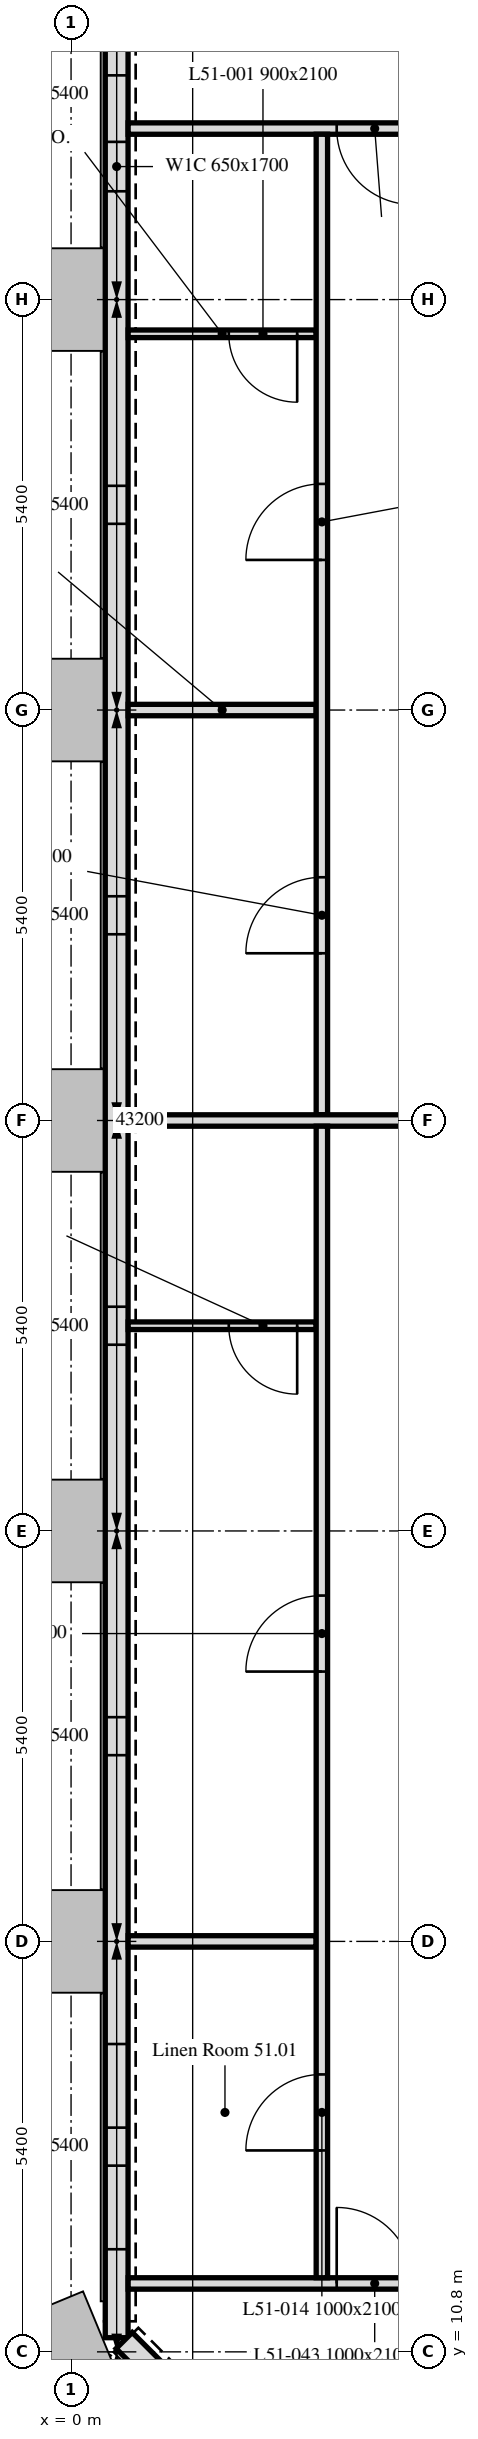
"""IFC4 building model, lengths in metres.
Left out: names, types, materials, properties, quantities, classifications, styles, units other than length and angle.
Written with IfcOpenShell. Run it as: python <this file> out.ifc"""

import sys

from ifc_helpers import new_model, si_unit, direction, frame, frame_2d, origin, place, context, subcontext, project, spatial, rectangle, extrude, element, fill, save


model = new_model("IFC4")
c1 = context("Model", 3, precision=1e-05, world=origin(), true_north=direction((0.0, 1.0)))
c2 = subcontext(c1, "Body", "Model", "MODEL_VIEW")
j1 = project(units=[si_unit("LENGTHUNIT", "METRE"), si_unit("PLANEANGLEUNIT", "RADIAN")], contexts=[c1])
p1 = place(None, origin())
s1 = spatial("IfcSite", under=j1, at=p1, CompositionType="ELEMENT")
p2 = place(p1, origin())
s2 = spatial("IfcBuilding", under=s1, at=p2, CompositionType="ELEMENT")
p3 = place(p2, frame((0.0, 0.0, 207.1)))
s3 = spatial("IfcBuildingStorey", under=s2, at=p3, CompositionType="ELEMENT", Elevation=207.1)
p4 = place(p3, frame((0.6, 43.014, 0.0), z_axis=(0.0, 0.0, 1.0), x_axis=(0.0, -1.0, 0.0)))
e1 = element("IfcWall", 1, at=p4, inside=s3, PredefinedType="SOLIDWALL", context=c2, shape_type="SweptSolid", body=[
    extrude(rectangle(XDim=32.027, YDim=0.3, at=frame_2d((16.014, 0.0))), origin(), (0.0, 0.0, 1.0), 3.0),
])
p5 = place(p4, frame((1.164, 0.0, 0.9)))
e2 = element("IfcOpeningElement", 2, at=p5, cuts=e1, PredefinedType="OPENING", context=c2, shape_type="SweptSolid", body=[
    extrude(rectangle(XDim=1.1, YDim=1.7, at=frame_2d((0.55, 0.85))), frame((0.0, 0.16, 0.0), z_axis=(0.0, -1.0, 0.0), x_axis=(1.0, 0.0, 0.0)), (0.0, 0.0, 1.0), 0.32),
])
p6 = place(p4, frame((3.139, 0.0, 0.9)))
e3 = element("IfcOpeningElement", 3, at=p6, cuts=e1, PredefinedType="OPENING", context=c2, shape_type="SweptSolid", body=[
    extrude(rectangle(XDim=0.65, YDim=1.7, at=frame_2d((0.325, 0.85))), frame((0.0, 0.16, 0.0), z_axis=(0.0, -1.0, 0.0), x_axis=(1.0, 0.0, 0.0)), (0.0, 0.0, 1.0), 0.32),
])
p7 = place(p4, frame((7.664, 0.0, 0.9)))
e4 = element("IfcOpeningElement", 4, at=p7, cuts=e1, PredefinedType="OPENING", context=c2, shape_type="SweptSolid", body=[
    extrude(rectangle(XDim=0.5, YDim=1.7, at=frame_2d((0.25, 0.85))), frame((0.0, 0.16, 0.0), z_axis=(0.0, -1.0, 0.0), x_axis=(1.0, 0.0, 0.0)), (0.0, 0.0, 1.0), 0.32),
])
p8 = place(p4, frame((13.064, 0.0, 0.9)))
e5 = element("IfcOpeningElement", 5, at=p8, cuts=e1, PredefinedType="OPENING", context=c2, shape_type="SweptSolid", body=[
    extrude(rectangle(XDim=0.5, YDim=1.7, at=frame_2d((0.25, 0.85))), frame((0.0, 0.16, 0.0), z_axis=(0.0, -1.0, 0.0), x_axis=(1.0, 0.0, 0.0)), (0.0, 0.0, 1.0), 0.32),
])
p9 = place(p4, frame((18.464, 0.0, 0.9)))
e6 = element("IfcOpeningElement", 6, at=p9, cuts=e1, PredefinedType="OPENING", context=c2, shape_type="SweptSolid", body=[
    extrude(rectangle(XDim=0.5, YDim=1.7, at=frame_2d((0.25, 0.85))), frame((0.0, 0.16, 0.0), z_axis=(0.0, -1.0, 0.0), x_axis=(1.0, 0.0, 0.0)), (0.0, 0.0, 1.0), 0.32),
])
p10 = place(p4, frame((23.864, 0.0, 0.9)))
e7 = element("IfcOpeningElement", 7, at=p10, cuts=e1, PredefinedType="OPENING", context=c2, shape_type="SweptSolid", body=[
    extrude(rectangle(XDim=0.5, YDim=1.7, at=frame_2d((0.25, 0.85))), frame((0.0, 0.16, 0.0), z_axis=(0.0, -1.0, 0.0), x_axis=(1.0, 0.0, 0.0)), (0.0, 0.0, 1.0), 0.32),
])
p11 = place(p4, frame((28.164, 0.0, 0.9)))
e8 = element("IfcOpeningElement", 8, at=p11, cuts=e1, PredefinedType="OPENING", context=c2, shape_type="SweptSolid", body=[
    extrude(rectangle(XDim=1.1, YDim=1.7, at=frame_2d((0.55, 0.85))), frame((0.0, 0.16, 0.0), z_axis=(0.0, -1.0, 0.0), x_axis=(1.0, 0.0, 0.0)), (0.0, 0.0, 1.0), 0.32),
])
p12 = place(p4, frame((29.764, 0.0, 0.9)))
e9 = element("IfcOpeningElement", 9, at=p12, cuts=e1, PredefinedType="OPENING", context=c2, shape_type="SweptSolid", body=[
    extrude(rectangle(XDim=1.1, YDim=1.7, at=frame_2d((0.55, 0.85))), frame((0.0, 0.16, 0.0), z_axis=(0.0, -1.0, 0.0), x_axis=(1.0, 0.0, 0.0)), (0.0, 0.0, 1.0), 0.32),
])
p13 = place(p3, frame((0.699, 10.949, 0.0), z_axis=(0.0, 0.0, 1.0), x_axis=(0.707106781187, -0.707106781187, 0.0)))
e10 = element("IfcWall", 10, at=p13, inside=s3, PredefinedType="SOLIDWALL", context=c2, shape_type="SweptSolid", body=[
    extrude(rectangle(XDim=6.86, YDim=0.3, at=frame_2d((3.43, 0.0))), origin(), (0.0, 0.0, 1.0), 3.0),
])
p14 = place(p13, frame((1.73, 0.0, 0.9)))
e11 = element("IfcOpeningElement", 11, at=p14, cuts=e10, PredefinedType="OPENING", context=c2, shape_type="SweptSolid", body=[
    extrude(rectangle(XDim=3.4, YDim=1.7, at=frame_2d((1.7, 0.85))), frame((0.0, 0.16, 0.0), z_axis=(0.0, -1.0, 0.0), x_axis=(1.0, 0.0, 0.0)), (0.0, 0.0, 1.0), 0.32),
])
p15 = place(p3, frame((3.225, 37.35, 0.0), z_axis=(0.0, 0.0, 1.0), x_axis=(-1.0, 0.0, 0.0)))
e12 = element("IfcWall", 12, at=p15, inside=s3, PredefinedType="PARTITIONING", context=c2, shape_type="SweptSolid", body=[
    extrude(rectangle(XDim=2.474, YDim=0.1, at=frame_2d((1.237, 0.0))), origin(), (0.0, 0.0, 1.0), 3.0),
])
p16 = place(p15, frame((0.25, 0.0, 0.0)))
e13 = element("IfcOpeningElement", 13, at=p16, cuts=e12, PredefinedType="OPENING", context=c2, shape_type="SweptSolid", body=[
    extrude(rectangle(XDim=0.9, YDim=2.1, at=frame_2d((0.45, 1.05))), frame((0.0, 0.05, 0.0), z_axis=(0.0, -1.0, 0.0), x_axis=(1.0, 0.0, 0.0)), (0.0, 0.0, 1.0), 0.1),
])
p17 = place(p3, frame((0.751, 32.4, 0.0), z_axis=(0.0, 0.0, 1.0), x_axis=(1.0, 0.0, 0.0)))
e14 = element("IfcWall", 14, at=p17, inside=s3, PredefinedType="PARTITIONING", context=c2, shape_type="SweptSolid", body=[
    extrude(rectangle(XDim=2.474, YDim=0.15, at=frame_2d((1.237, 0.0))), origin(), (0.0, 0.0, 1.0), 2.4),
])
p18 = place(p3, frame((42.449, 40.05, 0.0), z_axis=(0.0, 0.0, 1.0), x_axis=(-1.0, 0.0, 0.0)))
e15 = element("IfcWall", 15, at=p18, inside=s3, PredefinedType="PARTITIONING", context=c2, shape_type="SweptSolid", body=[
    extrude(rectangle(XDim=41.698, YDim=0.15, at=frame_2d((20.849, 0.0))), origin(), (0.0, 0.0, 1.0), 2.4),
])
p19 = place(p18, frame((2.249, 0.0, 0.0)))
e16 = element("IfcOpeningElement", 16, at=p19, cuts=e15, PredefinedType="OPENING", context=c2, shape_type="SweptSolid", body=[
    extrude(rectangle(XDim=1.0, YDim=2.1, at=frame_2d((0.5, 1.05))), frame((0.0, 0.075, 0.0), z_axis=(0.0, -1.0, 0.0), x_axis=(1.0, 0.0, 0.0)), (0.0, 0.0, 1.0), 0.15),
])
p20 = place(p18, frame((6.849, 0.0, 0.0)))
e17 = element("IfcOpeningElement", 17, at=p20, cuts=e15, PredefinedType="OPENING", context=c2, shape_type="SweptSolid", body=[
    extrude(rectangle(XDim=1.0, YDim=2.1, at=frame_2d((0.5, 1.05))), frame((0.0, 0.075, 0.0), z_axis=(0.0, -1.0, 0.0), x_axis=(1.0, 0.0, 0.0)), (0.0, 0.0, 1.0), 0.15),
])
p21 = place(p18, frame((18.449, 0.0, 0.0)))
e18 = element("IfcOpeningElement", 18, at=p21, cuts=e15, PredefinedType="OPENING", context=c2, shape_type="SweptSolid", body=[
    extrude(rectangle(XDim=1.0, YDim=2.1, at=frame_2d((0.5, 1.05))), frame((0.0, 0.075, 0.0), z_axis=(0.0, -1.0, 0.0), x_axis=(1.0, 0.0, 0.0)), (0.0, 0.0, 1.0), 0.15),
])
p22 = place(p18, frame((23.049, 0.0, 0.0)))
e19 = element("IfcOpeningElement", 19, at=p22, cuts=e15, PredefinedType="OPENING", context=c2, shape_type="SweptSolid", body=[
    extrude(rectangle(XDim=1.0, YDim=2.1, at=frame_2d((0.5, 1.05))), frame((0.0, 0.075, 0.0), z_axis=(0.0, -1.0, 0.0), x_axis=(1.0, 0.0, 0.0)), (0.0, 0.0, 1.0), 0.15),
])
p23 = place(p18, frame((37.954, 0.0, 0.0)))
e20 = element("IfcOpeningElement", 20, at=p23, cuts=e15, PredefinedType="OPENING", context=c2, shape_type="SweptSolid", body=[
    extrude(rectangle(XDim=1.0, YDim=2.1, at=frame_2d((0.5, 1.05))), frame((0.0, 0.075, 0.0), z_axis=(0.0, -1.0, 0.0), x_axis=(1.0, 0.0, 0.0)), (0.0, 0.0, 1.0), 0.15),
])
p24 = place(p3, frame((3.3, 27.075, 0.0), z_axis=(0.0, 0.0, 1.0), x_axis=(0.0, 1.0, 0.0)))
e21 = element("IfcWall", 21, at=p24, inside=s3, PredefinedType="PARTITIONING", context=c2, shape_type="SweptSolid", body=[
    extrude(rectangle(XDim=12.9, YDim=0.15, at=frame_2d((6.45, 0.0))), origin(), (0.0, 0.0, 1.0), 2.4),
])
p25 = place(p24, frame((2.125, 0.0, 0.0)))
e22 = element("IfcOpeningElement", 22, at=p25, cuts=e21, PredefinedType="OPENING", context=c2, shape_type="SweptSolid", body=[
    extrude(rectangle(XDim=1.0, YDim=2.1, at=frame_2d((0.5, 1.05))), frame((0.0, 0.075, 0.0), z_axis=(0.0, -1.0, 0.0), x_axis=(1.0, 0.0, 0.0)), (0.0, 0.0, 1.0), 0.15),
])
p26 = place(p24, frame((7.3, 0.0, 0.0)))
e23 = element("IfcOpeningElement", 23, at=p26, cuts=e21, PredefinedType="OPENING", context=c2, shape_type="SweptSolid", body=[
    extrude(rectangle(XDim=1.0, YDim=2.1, at=frame_2d((0.5, 1.05))), frame((0.0, 0.075, 0.0), z_axis=(0.0, -1.0, 0.0), x_axis=(1.0, 0.0, 0.0)), (0.0, 0.0, 1.0), 0.15),
])
p27 = place(p3, frame((0.751, 27.0, 0.0), z_axis=(0.0, 0.0, 1.0), x_axis=(1.0, 0.0, 0.0)))
e24 = element("IfcWall", 24, at=p27, inside=s3, PredefinedType="PARTITIONING", context=c2, shape_type="SweptSolid", body=[
    extrude(rectangle(XDim=4.649, YDim=0.15, at=frame_2d((2.324, 0.0))), origin(), (0.0, 0.0, 1.0), 2.4),
])
p28 = place(p3, frame((3.225, 16.2, 0.0), z_axis=(0.0, 0.0, 1.0), x_axis=(-1.0, 0.0, 0.0)))
e25 = element("IfcWall", 25, at=p28, inside=s3, PredefinedType="PARTITIONING", context=c2, shape_type="SweptSolid", body=[
    extrude(rectangle(XDim=2.474, YDim=0.15, at=frame_2d((1.237, 0.0))), origin(), (0.0, 0.0, 1.0), 2.4),
])
p29 = place(p3, frame((0.751, 11.7, 0.0), z_axis=(0.0, 0.0, 1.0), x_axis=(1.0, 0.0, 0.0)))
e26 = element("IfcWall", 26, at=p29, inside=s3, PredefinedType="PARTITIONING", context=c2, shape_type="SweptSolid", body=[
    extrude(rectangle(XDim=41.698, YDim=0.15, at=frame_2d((20.849, 0.0))), origin(), (0.0, 0.0, 1.0), 3.0),
])
p30 = place(p29, frame((27.649, 0.0, 0.0)))
e27 = element("IfcOpeningElement", 27, at=p30, cuts=e26, PredefinedType="OPENING", context=c2, shape_type="SweptSolid", body=[
    extrude(rectangle(XDim=1.0, YDim=2.1, at=frame_2d((0.5, 1.05))), frame((0.0, 0.075, 0.0), z_axis=(0.0, -1.0, 0.0), x_axis=(1.0, 0.0, 0.0)), (0.0, 0.0, 1.0), 0.15),
])
p31 = place(p29, frame((22.249, 0.0, 0.0)))
e28 = element("IfcOpeningElement", 28, at=p31, cuts=e26, PredefinedType="OPENING", context=c2, shape_type="SweptSolid", body=[
    extrude(rectangle(XDim=1.0, YDim=2.1, at=frame_2d((0.5, 1.05))), frame((0.0, 0.075, 0.0), z_axis=(0.0, -1.0, 0.0), x_axis=(1.0, 0.0, 0.0)), (0.0, 0.0, 1.0), 0.15),
])
p32 = place(p29, frame((16.849, 0.0, 0.0)))
e29 = element("IfcOpeningElement", 29, at=p32, cuts=e26, PredefinedType="OPENING", context=c2, shape_type="SweptSolid", body=[
    extrude(rectangle(XDim=1.0, YDim=2.1, at=frame_2d((0.5, 1.05))), frame((0.0, 0.075, 0.0), z_axis=(0.0, -1.0, 0.0), x_axis=(1.0, 0.0, 0.0)), (0.0, 0.0, 1.0), 0.15),
])
p33 = place(p29, frame((11.449, 0.0, 0.0)))
e30 = element("IfcOpeningElement", 30, at=p33, cuts=e26, PredefinedType="OPENING", context=c2, shape_type="SweptSolid", body=[
    extrude(rectangle(XDim=1.0, YDim=2.1, at=frame_2d((0.5, 1.05))), frame((0.0, 0.075, 0.0), z_axis=(0.0, -1.0, 0.0), x_axis=(1.0, 0.0, 0.0)), (0.0, 0.0, 1.0), 0.15),
])
p34 = place(p29, frame((2.744, 0.0, 0.0)))
e31 = element("IfcOpeningElement", 31, at=p34, cuts=e26, PredefinedType="OPENING", context=c2, shape_type="SweptSolid", body=[
    extrude(rectangle(XDim=1.0, YDim=2.1, at=frame_2d((0.5, 1.05))), frame((0.0, 0.075, 0.0), z_axis=(0.0, -1.0, 0.0), x_axis=(1.0, 0.0, 0.0)), (0.0, 0.0, 1.0), 0.15),
])
p35 = place(p29, frame((39.249, 0.0, 0.0)))
e32 = element("IfcOpeningElement", 32, at=p35, cuts=e26, PredefinedType="OPENING", context=c2, shape_type="SweptSolid", body=[
    extrude(rectangle(XDim=1.0, YDim=2.1, at=frame_2d((0.5, 1.05))), frame((0.0, 0.075, 0.0), z_axis=(0.0, -1.0, 0.0), x_axis=(1.0, 0.0, 0.0)), (0.0, 0.0, 1.0), 0.15),
])
p36 = place(p3, frame((3.225, 24.3, 0.0), z_axis=(0.0, 0.0, 1.0), x_axis=(-1.0, 0.0, 0.0)))
e33 = element("IfcWall", 33, at=p36, inside=s3, PredefinedType="PARTITIONING", context=c2, shape_type="SweptSolid", body=[
    extrude(rectangle(XDim=2.474, YDim=0.1, at=frame_2d((1.237, 0.0))), origin(), (0.0, 0.0, 1.0), 3.0),
])
p37 = place(p36, frame((0.25, 0.0, 0.0)))
e34 = element("IfcOpeningElement", 34, at=p37, cuts=e33, PredefinedType="OPENING", context=c2, shape_type="SweptSolid", body=[
    extrude(rectangle(XDim=0.9, YDim=2.1, at=frame_2d((0.45, 1.05))), frame((0.0, 0.05, 0.0), z_axis=(0.0, -1.0, 0.0), x_axis=(1.0, 0.0, 0.0)), (0.0, 0.0, 1.0), 0.1),
])
p38 = place(p3, frame((3.3, 11.775, 0.0), z_axis=(0.0, 0.0, 1.0), x_axis=(0.0, 1.0, 0.0)))
e35 = element("IfcWall", 35, at=p38, inside=s3, PredefinedType="PARTITIONING", context=c2, shape_type="SweptSolid", body=[
    extrude(rectangle(XDim=15.15, YDim=0.15, at=frame_2d((7.575, 0.0))), origin(), (0.0, 0.0, 1.0), 2.4),
])
p39 = place(p38, frame((1.675, 0.0, 0.0)))
e36 = element("IfcOpeningElement", 36, at=p39, cuts=e35, PredefinedType="OPENING", context=c2, shape_type="SweptSolid", body=[
    extrude(rectangle(XDim=1.0, YDim=2.1, at=frame_2d((0.5, 1.05))), frame((0.0, 0.075, 0.0), z_axis=(0.0, -1.0, 0.0), x_axis=(1.0, 0.0, 0.0)), (0.0, 0.0, 1.0), 0.15),
])
p40 = place(p38, frame((7.975, 0.0, 0.0)))
e37 = element("IfcOpeningElement", 37, at=p40, cuts=e35, PredefinedType="OPENING", context=c2, shape_type="SweptSolid", body=[
    extrude(rectangle(XDim=1.0, YDim=2.1, at=frame_2d((0.5, 1.05))), frame((0.0, 0.075, 0.0), z_axis=(0.0, -1.0, 0.0), x_axis=(1.0, 0.0, 0.0)), (0.0, 0.0, 1.0), 0.15),
])
p41 = place(p5, origin())
e38 = element("IfcWindow", 38, at=p41, inside=s3, PartitioningType="SINGLE_PANEL", PredefinedType="WINDOW", context=c2, shape_type="SweptSolid", body=[
    extrude(rectangle(XDim=1.1, YDim=1.7, at=frame_2d((0.55, 0.85))), frame((0.0, 0.03, 0.0), z_axis=(0.0, -1.0, 0.0), x_axis=(1.0, 0.0, 0.0)), (0.0, 0.0, 1.0), 0.06),
])
fill(e2, e38)
p42 = place(p6, origin())
e39 = element("IfcWindow", 39, at=p42, inside=s3, PartitioningType="SINGLE_PANEL", PredefinedType="WINDOW", context=c2, shape_type="SweptSolid", body=[
    extrude(rectangle(XDim=0.65, YDim=1.7, at=frame_2d((0.325, 0.85))), frame((0.0, 0.03, 0.0), z_axis=(0.0, -1.0, 0.0), x_axis=(1.0, 0.0, 0.0)), (0.0, 0.0, 1.0), 0.06),
])
fill(e3, e39)
p43 = place(p7, origin())
e40 = element("IfcWindow", 40, at=p43, inside=s3, PartitioningType="SINGLE_PANEL", PredefinedType="WINDOW", context=c2, shape_type="SweptSolid", body=[
    extrude(rectangle(XDim=0.5, YDim=1.7, at=frame_2d((0.25, 0.85))), frame((0.0, 0.03, 0.0), z_axis=(0.0, -1.0, 0.0), x_axis=(1.0, 0.0, 0.0)), (0.0, 0.0, 1.0), 0.06),
])
fill(e4, e40)
p44 = place(p8, origin())
e41 = element("IfcWindow", 41, at=p44, inside=s3, PartitioningType="SINGLE_PANEL", PredefinedType="WINDOW", context=c2, shape_type="SweptSolid", body=[
    extrude(rectangle(XDim=0.5, YDim=1.7, at=frame_2d((0.25, 0.85))), frame((0.0, 0.03, 0.0), z_axis=(0.0, -1.0, 0.0), x_axis=(1.0, 0.0, 0.0)), (0.0, 0.0, 1.0), 0.06),
])
fill(e5, e41)
p45 = place(p9, origin())
e42 = element("IfcWindow", 42, at=p45, inside=s3, PartitioningType="SINGLE_PANEL", PredefinedType="WINDOW", context=c2, shape_type="SweptSolid", body=[
    extrude(rectangle(XDim=0.5, YDim=1.7, at=frame_2d((0.25, 0.85))), frame((0.0, 0.03, 0.0), z_axis=(0.0, -1.0, 0.0), x_axis=(1.0, 0.0, 0.0)), (0.0, 0.0, 1.0), 0.06),
])
fill(e6, e42)
p46 = place(p10, origin())
e43 = element("IfcWindow", 43, at=p46, inside=s3, PartitioningType="SINGLE_PANEL", PredefinedType="WINDOW", context=c2, shape_type="SweptSolid", body=[
    extrude(rectangle(XDim=0.5, YDim=1.7, at=frame_2d((0.25, 0.85))), frame((0.0, 0.03, 0.0), z_axis=(0.0, -1.0, 0.0), x_axis=(1.0, 0.0, 0.0)), (0.0, 0.0, 1.0), 0.06),
])
fill(e7, e43)
p47 = place(p11, origin())
e44 = element("IfcWindow", 44, at=p47, inside=s3, PartitioningType="SINGLE_PANEL", PredefinedType="WINDOW", context=c2, shape_type="SweptSolid", body=[
    extrude(rectangle(XDim=1.1, YDim=1.7, at=frame_2d((0.55, 0.85))), frame((0.0, 0.03, 0.0), z_axis=(0.0, -1.0, 0.0), x_axis=(1.0, 0.0, 0.0)), (0.0, 0.0, 1.0), 0.06),
])
fill(e8, e44)
p48 = place(p12, origin())
e45 = element("IfcWindow", 45, at=p48, inside=s3, PartitioningType="SINGLE_PANEL", PredefinedType="WINDOW", context=c2, shape_type="SweptSolid", body=[
    extrude(rectangle(XDim=1.1, YDim=1.7, at=frame_2d((0.55, 0.85))), frame((0.0, 0.03, 0.0), z_axis=(0.0, -1.0, 0.0), x_axis=(1.0, 0.0, 0.0)), (0.0, 0.0, 1.0), 0.06),
])
fill(e9, e45)
p49 = place(p16, origin())
e46 = element("IfcDoor", 46, at=p49, inside=s3, OperationType="SINGLE_SWING_LEFT", PredefinedType="DOOR", context=c2, shape_type="SweptSolid", body=[
    extrude(rectangle(XDim=0.9, YDim=2.1, at=frame_2d((0.45, 1.05))), frame((0.0, 0.025, 0.0), z_axis=(0.0, -1.0, 0.0), x_axis=(1.0, 0.0, 0.0)), (0.0, 0.0, 1.0), 0.05),
])
fill(e13, e46)
p50 = place(p25, origin())
e47 = element("IfcDoor", 47, at=p50, inside=s3, OperationType="SINGLE_SWING_RIGHT", PredefinedType="DOOR", context=c2, shape_type="SweptSolid", body=[
    extrude(rectangle(XDim=1.0, YDim=2.1, at=frame_2d((0.5, 1.05))), frame((0.0, 0.025, 0.0), z_axis=(0.0, -1.0, 0.0), x_axis=(1.0, 0.0, 0.0)), (0.0, 0.0, 1.0), 0.05),
])
fill(e22, e47)
p51 = place(p39, origin())
e48 = element("IfcDoor", 48, at=p51, inside=s3, OperationType="SINGLE_SWING_LEFT", PredefinedType="DOOR", context=c2, shape_type="SweptSolid", body=[
    extrude(rectangle(XDim=1.0, YDim=2.1, at=frame_2d((0.5, 1.05))), frame((0.0, 0.025, 0.0), z_axis=(0.0, -1.0, 0.0), x_axis=(1.0, 0.0, 0.0)), (0.0, 0.0, 1.0), 0.05),
])
fill(e36, e48)
p52 = place(p37, origin())
e49 = element("IfcDoor", 49, at=p52, inside=s3, OperationType="SINGLE_SWING_RIGHT", PredefinedType="DOOR", context=c2, shape_type="SweptSolid", body=[
    extrude(rectangle(XDim=0.9, YDim=2.1, at=frame_2d((0.45, 1.05))), frame((0.0, 0.025, 0.0), z_axis=(0.0, -1.0, 0.0), x_axis=(1.0, 0.0, 0.0)), (0.0, 0.0, 1.0), 0.05),
])
fill(e34, e49)
p53 = place(p26, origin())
e50 = element("IfcDoor", 50, at=p53, inside=s3, OperationType="SINGLE_SWING_LEFT", PredefinedType="DOOR", context=c2, shape_type="SweptSolid", body=[
    extrude(rectangle(XDim=1.0, YDim=2.1, at=frame_2d((0.5, 1.05))), frame((0.0, 0.025, 0.0), z_axis=(0.0, -1.0, 0.0), x_axis=(1.0, 0.0, 0.0)), (0.0, 0.0, 1.0), 0.05),
])
fill(e23, e50)
p54 = place(p23, origin())
e51 = element("IfcDoor", 51, at=p54, inside=s3, OperationType="SINGLE_SWING_LEFT", PredefinedType="DOOR", context=c2, shape_type="SweptSolid", body=[
    extrude(rectangle(XDim=1.0, YDim=2.1, at=frame_2d((0.5, 1.05))), frame((0.0, 0.025, 0.0), z_axis=(0.0, -1.0, 0.0), x_axis=(1.0, 0.0, 0.0)), (0.0, 0.0, 1.0), 0.05),
])
fill(e20, e51)
p55 = place(p34, origin())
e52 = element("IfcDoor", 52, at=p55, inside=s3, OperationType="SINGLE_SWING_RIGHT", PredefinedType="DOOR", context=c2, shape_type="SweptSolid", body=[
    extrude(rectangle(XDim=1.0, YDim=2.1, at=frame_2d((0.5, 1.05))), frame((0.0, 0.025, 0.0), z_axis=(0.0, -1.0, 0.0), x_axis=(1.0, 0.0, 0.0)), (0.0, 0.0, 1.0), 0.05),
])
fill(e31, e52)
p56 = place(p40, origin())
e53 = element("IfcDoor", 53, at=p56, inside=s3, OperationType="SINGLE_SWING_LEFT", PredefinedType="DOOR", context=c2, shape_type="SweptSolid", body=[
    extrude(rectangle(XDim=1.0, YDim=2.1, at=frame_2d((0.5, 1.05))), frame((0.0, 0.025, 0.0), z_axis=(0.0, -1.0, 0.0), x_axis=(1.0, 0.0, 0.0)), (0.0, 0.0, 1.0), 0.05),
])
fill(e37, e53)
save(model, sys.argv[1])
